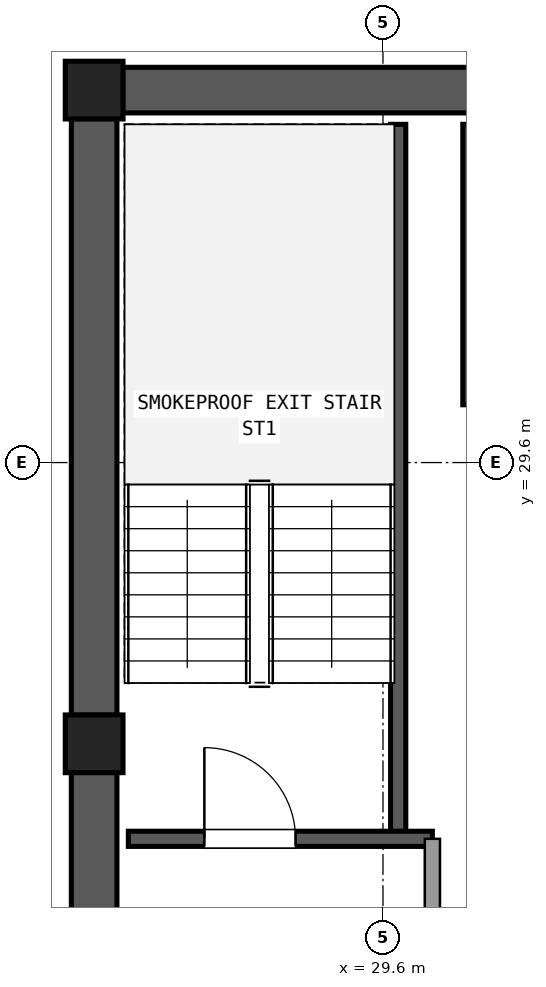
"""IFC4 building model, lengths in metres.
Left out: names, types, materials, properties, quantities, classifications, styles, units other than length and angle.
Written with IfcOpenShell. Run it as: python <this file> out.ifc"""

import sys

from ifc_helpers import new_model, si_unit, direction, frame, frame_2d, origin, origin_2d, place, context, subcontext, project, spatial, rectangle, extrude, element, fill, save


model = new_model("IFC4")
c1 = context("Model", 3, precision=1e-05, world=origin(), true_north=direction((0.0, 1.0)))
c2 = subcontext(c1, "Body", "Model", "MODEL_VIEW")
j1 = project(units=[si_unit("LENGTHUNIT", "METRE"), si_unit("PLANEANGLEUNIT", "RADIAN")], contexts=[c1])
p1 = place(None, origin())
s1 = spatial("IfcSite", under=j1, at=p1, CompositionType="ELEMENT")
p2 = place(p1, origin())
s2 = spatial("IfcBuilding", under=s1, at=p2, CompositionType="ELEMENT")
p3 = place(p2, frame((0.0, 0.0, 260.82)))
s3 = spatial("IfcBuildingStorey", under=s2, at=p3, CompositionType="ELEMENT", Elevation=260.82)
for number, where, z_axis, x_axis in (
    (1, (25.8, 34.5, 0.0), (0.0, 0.0, 1.0), (1.0, 0.0, 0.0)),
    (2, (25.8, 25.9, 0.0), (0.0, 0.0, 1.0), (1.0, 0.0, 0.0)),
):
    element("IfcColumn", number, at=place(p3, frame(where, z_axis=z_axis, x_axis=x_axis)), inside=s3, PredefinedType="COLUMN", context=c2, shape_type="SweptSolid", body=[
        extrude(rectangle(XDim=0.76, YDim=0.76, at=origin_2d()), origin(), (0.0, 0.0, 1.0), 3.6),
    ])
p4 = place(p3, frame((36.625, 34.5, 0.0), z_axis=(0.0, 0.0, 1.0), x_axis=(-1.0, 0.0, 0.0)))
e3 = element("IfcWall", 3, at=p4, inside=s3, PredefinedType="SHEAR", context=c2, shape_type="SweptSolid", body=[
    extrude(rectangle(XDim=10.45, YDim=0.6, at=frame_2d((5.225, 0.0))), origin(), (0.0, 0.0, 1.0), 3.32),
])
p5 = place(p4, frame((4.225, 0.0, 0.0)))
e4 = element("IfcOpeningElement", 4, at=p5, cuts=e3, PredefinedType="OPENING", context=c2, shape_type="SweptSolid", body=[
    extrude(rectangle(XDim=1.2, YDim=2.15, at=frame_2d((0.6, 1.075))), frame((0.0, 0.31, 0.0), z_axis=(0.0, -1.0, 0.0), x_axis=(1.0, 0.0, 0.0)), (0.0, 0.0, 1.0), 0.62),
])
p6 = place(p3, frame((25.8, 34.125, 0.0), z_axis=(0.0, 0.0, 1.0), x_axis=(0.0, -1.0, 0.0)))
e5 = element("IfcWall", 5, at=p6, inside=s3, PredefinedType="SHEAR", context=c2, shape_type="SweptSolid", body=[
    extrude(rectangle(XDim=7.85, YDim=0.6, at=frame_2d((3.925, 0.0))), origin(), (0.0, 0.0, 1.0), 3.32),
])
p7 = place(p3, frame((25.8, 25.525, 0.0), z_axis=(0.0, 0.0, 1.0), x_axis=(0.0, -1.0, 0.0)))
e6 = element("IfcWall", 6, at=p7, inside=s3, PredefinedType="SHEAR", context=c2, shape_type="SweptSolid", body=[
    extrude(rectangle(XDim=7.85, YDim=0.6, at=frame_2d((3.925, 0.0))), origin(), (0.0, 0.0, 1.0), 3.32),
])
p8 = place(p7, frame((2.275, 0.0, 0.0)))
e7 = element("IfcOpeningElement", 7, at=p8, cuts=e6, PredefinedType="OPENING", context=c2, shape_type="SweptSolid", body=[
    extrude(rectangle(XDim=1.2, YDim=2.15, at=frame_2d((0.6, 1.075))), frame((0.0, 0.31, 0.0), z_axis=(0.0, -1.0, 0.0), x_axis=(1.0, 0.0, 0.0)), (0.0, 0.0, 1.0), 0.62),
])
p9 = place(p3, frame((29.8, 24.65, 0.0), z_axis=(0.0, 0.0, 1.0), x_axis=(0.0, 1.0, 0.0)))
e8 = element("IfcWall", 8, at=p9, inside=s3, PredefinedType="SHEAR", context=c2, shape_type="SweptSolid", body=[
    extrude(rectangle(XDim=9.4, YDim=0.2, at=frame_2d((4.7, 0.0))), origin(), (0.0, 0.0, 1.0), 3.32),
])
p10 = place(p3, frame((26.25, 24.65, 0.0), z_axis=(0.0, 0.0, 1.0), x_axis=(1.0, 0.0, 0.0)))
e9 = element("IfcWall", 9, at=p10, inside=s3, PredefinedType="SHEAR", context=c2, shape_type="SweptSolid", body=[
    extrude(rectangle(XDim=4.0, YDim=0.2, at=frame_2d((2.0, 0.0))), origin(), (0.0, 0.0, 1.0), 3.32),
])
p11 = place(p10, frame((1.0, 0.0, 0.0)))
e10 = element("IfcOpeningElement", 10, at=p11, cuts=e9, PredefinedType="OPENING", context=c2, shape_type="SweptSolid", body=[
    extrude(rectangle(XDim=1.2, YDim=2.15, at=frame_2d((0.6, 1.075))), frame((0.0, 0.11, 0.0), z_axis=(0.0, -1.0, 0.0), x_axis=(1.0, 0.0, 0.0)), (0.0, 0.0, 1.0), 0.22),
])
p12 = place(p3, frame((30.75, 30.36, 0.0), z_axis=(0.0, 0.0, 1.0), x_axis=(0.0, 1.0, 0.0)))
e11 = element("IfcWall", 11, at=p12, inside=s3, PredefinedType="SHEAR", context=c2, shape_type="SweptSolid", body=[
    extrude(rectangle(XDim=3.69, YDim=0.2, at=frame_2d((1.845, 0.0))), origin(), (0.0, 0.0, 1.0), 3.32),
])
p13 = place(p3, frame((30.25, 17.75, 0.0), z_axis=(0.0, 0.0, 1.0), x_axis=(0.0, 1.0, 0.0)))
e12 = element("IfcWall", 12, at=p13, inside=s3, PredefinedType="SOLIDWALL", context=c2, shape_type="SweptSolid", body=[
    extrude(rectangle(XDim=6.9, YDim=0.2, at=frame_2d((3.45, 0.0))), origin(), (0.0, 0.0, 1.0), 2.61),
])
p14 = place(p13, frame((4.15, 0.0, 0.0)))
e13 = element("IfcOpeningElement", 13, at=p14, cuts=e12, PredefinedType="OPENING", context=c2, shape_type="SweptSolid", body=[
    extrude(rectangle(XDim=1.2, YDim=2.15, at=frame_2d((0.6, 1.075))), frame((0.0, 0.11, 0.0), z_axis=(0.0, -1.0, 0.0), x_axis=(1.0, 0.0, 0.0)), (0.0, 0.0, 1.0), 0.22),
])
p15 = place(p11, origin())
e14 = element("IfcDoor", 14, at=p15, inside=s3, OperationType="SINGLE_SWING_LEFT", PredefinedType="DOOR", context=c2, shape_type="SweptSolid", body=[
    extrude(rectangle(XDim=1.2, YDim=2.15, at=frame_2d((0.6, 1.075))), frame((0.0, 0.025, 0.0), z_axis=(0.0, -1.0, 0.0), x_axis=(1.0, 0.0, 0.0)), (0.0, 0.0, 1.0), 0.05),
])
fill(e10, e14)
save(model, sys.argv[1])
